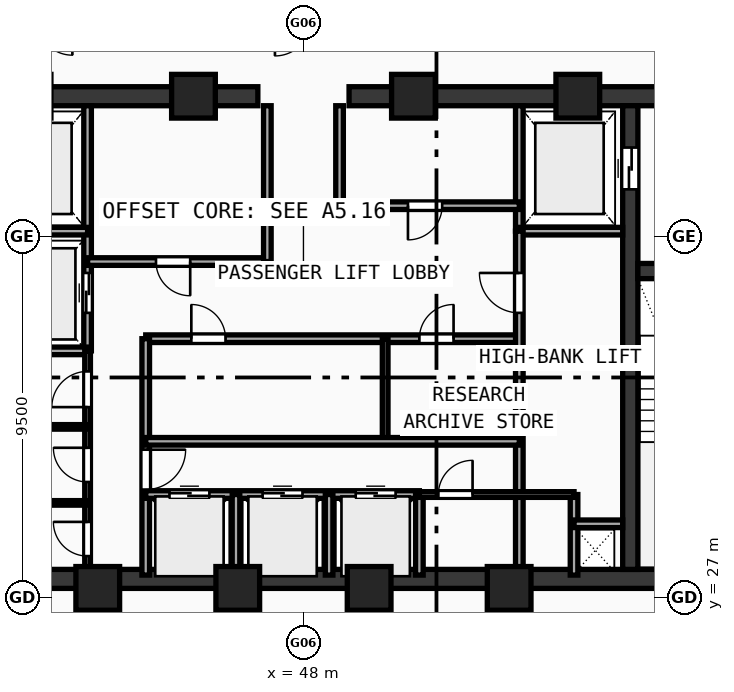
"""IFC4 building model, lengths in metres.
Left out: names, types, materials, properties, quantities, classifications, styles, units other than length and angle.
Written with IfcOpenShell. Run it as: python <this file> out.ifc"""

import sys

from ifc_helpers import new_model, si_unit, direction, frame, frame_2d, origin, origin_with_axes, origin_2d, place, context, subcontext, project, spatial, rectangle, hollow_rectangle, extrude, source, transform, mapped, element, fill, save


model = new_model("IFC4")
c1 = context("Model", 3, precision=1e-05, world=origin(), true_north=direction((0.0, 1.0)))
c2 = subcontext(c1, "Body", "Model", "MODEL_VIEW")
j1 = project(units=[si_unit("LENGTHUNIT", "METRE"), si_unit("PLANEANGLEUNIT", "RADIAN")], contexts=[c1])
p1 = place(None, origin())
s1 = spatial("IfcSite", under=j1, at=p1, CompositionType="ELEMENT")
p2 = place(p1, origin())
s2 = spatial("IfcBuilding", under=s1, at=p2, CompositionType="ELEMENT")
p3 = place(p2, frame((0.0, 0.0, 233.34)))
s3 = spatial("IfcBuildingStorey", under=s2, at=p3, CompositionType="ELEMENT", Elevation=233.34)
p4 = place(p3, frame((35.55, 27.5, 0.0), z_axis=(0.0, 0.0, 1.0), x_axis=(1.0, 0.0, 0.0)))
e1 = element("IfcWall", 1, at=p4, inside=s3, PredefinedType="SHEAR", context=c2, shape_type="SweptSolid", body=[
    extrude(rectangle(XDim=24.9, YDim=0.5, at=frame_2d((12.45, 0.0))), origin(), (0.0, 0.0, 1.0), 3.47),
])
p5 = place(p3, frame((35.55, 40.2, 0.0), z_axis=(0.0, 0.0, 1.0), x_axis=(1.0, 0.0, 0.0)))
e2 = element("IfcWall", 2, at=p5, inside=s3, PredefinedType="SHEAR", context=c2, shape_type="SweptSolid", body=[
    extrude(rectangle(XDim=11.25, YDim=0.5, at=frame_2d((5.625, 0.0))), origin(), (0.0, 0.0, 1.0), 3.47),
])
p6 = place(p5, frame((1.6, 0.0, 0.0)))
e3 = element("IfcOpeningElement", 3, at=p6, cuts=e2, PredefinedType="OPENING", context=c2, shape_type="SweptSolid", body=[
    extrude(rectangle(XDim=1.05, YDim=2.1, at=frame_2d((0.525, 1.05))), frame((0.0, 0.26, 0.0), z_axis=(0.0, -1.0, 0.0), x_axis=(1.0, 0.0, 0.0)), (0.0, 0.0, 1.0), 0.52),
])
p7 = place(p3, frame((49.2, 40.2, 0.0), z_axis=(0.0, 0.0, 1.0), x_axis=(1.0, 0.0, 0.0)))
e4 = element("IfcWall", 4, at=p7, inside=s3, PredefinedType="SHEAR", context=c2, shape_type="SweptSolid", body=[
    extrude(rectangle(XDim=11.25, YDim=0.5, at=frame_2d((5.625, 0.0))), origin(), (0.0, 0.0, 1.0), 3.47),
])
p8 = place(p7, frame((8.6, 0.0, 0.0)))
e5 = element("IfcOpeningElement", 5, at=p8, cuts=e4, PredefinedType="OPENING", context=c2, shape_type="SweptSolid", body=[
    extrude(rectangle(XDim=1.05, YDim=2.1, at=frame_2d((0.525, 1.05))), frame((0.0, 0.26, 0.0), z_axis=(0.0, -1.0, 0.0), x_axis=(1.0, 0.0, 0.0)), (0.0, 0.0, 1.0), 0.52),
])
p9 = place(p3, frame((56.6, 27.75, 0.0), z_axis=(0.0, 0.0, 1.0), x_axis=(0.0, 1.0, 0.0)))
e6 = element("IfcWall", 6, at=p9, inside=s3, PredefinedType="SHEAR", context=c2, shape_type="SweptSolid", body=[
    extrude(rectangle(XDim=12.2, YDim=0.4, at=frame_2d((6.1, 0.0))), origin(), (0.0, 0.0, 1.0), 3.47),
])
p10 = place(p9, frame((10.0, 0.0, 0.0)))
e7 = element("IfcOpeningElement", 7, at=p10, cuts=e6, PredefinedType="OPENING", context=c2, shape_type="SweptSolid", body=[
    extrude(rectangle(XDim=1.1, YDim=2.1, at=frame_2d((0.55, 1.05))), frame((0.0, 0.21, 0.0), z_axis=(0.0, -1.0, 0.0), x_axis=(1.0, 0.0, 0.0)), (0.0, 0.0, 1.0), 0.42),
])
p11 = place(p3, frame((56.8, 35.6, 0.0), z_axis=(0.0, 0.0, 1.0), x_axis=(1.0, 0.0, 0.0)))
e8 = element("IfcWall", 8, at=p11, inside=s3, PredefinedType="SHEAR", context=c2, shape_type="SweptSolid", body=[
    extrude(rectangle(XDim=3.15, YDim=0.4, at=frame_2d((1.575, 0.0))), origin(), (0.0, 0.0, 1.0), 3.47),
])
p12 = place(p11, frame((1.02, 0.0, 0.0)))
e9 = element("IfcOpeningElement", 9, at=p12, cuts=e8, PredefinedType="OPENING", context=c2, shape_type="SweptSolid", body=[
    extrude(rectangle(XDim=1.05, YDim=2.1, at=frame_2d((0.525, 1.05))), frame((0.0, 0.21, 0.0), z_axis=(0.0, -1.0, 0.0), x_axis=(1.0, 0.0, 0.0)), (0.0, 0.0, 1.0), 0.42),
])
m1 = source(origin(), c2, "Body", "SweptSolid", [
    extrude(hollow_rectangle(XDim=1.15, YDim=1.15, WallThickness=0.048, at=origin_2d()), origin(), (0.0, 0.0, 1.0), 3.73),
])
for number, where, z_axis, x_axis in (
    (10, (42.588, 27.25, -0.26), (0.0, 0.0, 1.0), (1.0, 0.0, 0.0)),
    (11, (46.272, 27.25, -0.26), (0.0, 0.0, 1.0), (1.0, 0.0, 0.0)),
    (12, (49.729, 27.25, -0.26), (0.0, 0.0, 1.0), (1.0, 0.0, 0.0)),
    (13, (53.412, 27.25, -0.26), (0.0, 0.0, 1.0), (1.0, 0.0, 0.0)),
    (14, (55.219, 40.2, -0.26), (0.0, 0.0, 1.0), (1.0, 0.0, 0.0)),
    (15, (50.894, 40.2, -0.26), (0.0, 0.0, 1.0), (1.0, 0.0, 0.0)),
    (16, (45.106, 40.2, -0.26), (0.0, 0.0, 1.0), (1.0, 0.0, 0.0)),
):
    element("IfcColumn", number, at=place(p3, frame(where, z_axis=z_axis, x_axis=x_axis)), inside=s3, PredefinedType="COLUMN", context=c2, shape_type="MappedRepresentation", body=[
        mapped(m1, transform((0.0, 0.0, 0.0), scale=1.0)),
    ])
p13 = place(p3, frame((42.32, 33.5, 0.0), z_axis=(0.0, 0.0, 1.0), x_axis=(0.0, 1.0, 0.0)))
e17 = element("IfcWall", 17, at=p13, inside=s3, PredefinedType="SOLIDWALL", context=c2, shape_type="SweptSolid", body=[
    extrude(rectangle(XDim=6.45, YDim=0.2, at=frame_2d((3.225, 0.0))), origin(), (0.0, 0.0, 1.0), 3.47),
])
p14 = place(p13, frame((1.0, 0.0, 0.0)))
e18 = element("IfcOpeningElement", 18, at=p14, cuts=e17, PredefinedType="OPENING", context=c2, shape_type="SweptSolid", body=[
    extrude(rectangle(XDim=1.05, YDim=2.1, at=frame_2d((0.525, 1.05))), frame((0.0, 0.11, 0.0), z_axis=(0.0, -1.0, 0.0), x_axis=(1.0, 0.0, 0.0)), (0.0, 0.0, 1.0), 0.22),
])
for number, where, z_axis, x_axis in (
    (19, (39.6, 36.65, 0.0), (0.0, 0.0, 1.0), (1.0, 0.0, 0.0)),
    (20, (39.6, 33.5, 0.0), (0.0, 0.0, 1.0), (1.0, 0.0, 0.0)),
):
    element("IfcWall", number, at=place(p3, frame(where, z_axis=z_axis, x_axis=x_axis)), inside=s3, PredefinedType="SOLIDWALL", context=c2, shape_type="SweptSolid", body=[
        extrude(rectangle(XDim=2.72, YDim=0.2, at=frame_2d((1.36, 0.0))), origin(), (0.0, 0.0, 1.0), 3.47),
    ])
p15 = place(p3, frame((53.68, 36.65, 0.0), z_axis=(0.0, 0.0, 1.0), x_axis=(0.0, 1.0, 0.0)))
e21 = element("IfcWall", 21, at=p15, inside=s3, PredefinedType="SOLIDWALL", context=c2, shape_type="SweptSolid", body=[
    extrude(rectangle(XDim=3.3, YDim=0.2, at=frame_2d((1.65, 0.0))), origin(), (0.0, 0.0, 1.0), 3.47),
])
p16 = place(p3, frame((53.68, 36.65, 0.0), z_axis=(0.0, 0.0, 1.0), x_axis=(1.0, 0.0, 0.0)))
e22 = element("IfcWall", 22, at=p16, inside=s3, PredefinedType="SOLIDWALL", context=c2, shape_type="SweptSolid", body=[
    extrude(rectangle(XDim=2.72, YDim=0.2, at=frame_2d((1.36, 0.0))), origin(), (0.0, 0.0, 1.0), 3.47),
])
p17 = place(p3, frame((42.32, 35.85, 0.0), z_axis=(0.0, 0.0, 1.0), x_axis=(1.0, 0.0, 0.0)))
e23 = element("IfcWall", 23, at=p17, inside=s3, PredefinedType="SOLIDWALL", context=c2, shape_type="SweptSolid", body=[
    extrude(rectangle(XDim=4.73, YDim=0.2, at=frame_2d((2.365, 0.0))), origin(), (0.0, 0.0, 1.0), 3.47),
])
p18 = place(p17, frame((1.8, 0.0, 0.0)))
e24 = element("IfcOpeningElement", 24, at=p18, cuts=e23, PredefinedType="OPENING", context=c2, shape_type="SweptSolid", body=[
    extrude(rectangle(XDim=0.9, YDim=2.1, at=frame_2d((0.45, 1.05))), frame((0.0, 0.11, 0.0), z_axis=(0.0, -1.0, 0.0), x_axis=(1.0, 0.0, 0.0)), (0.0, 0.0, 1.0), 0.22),
])
p19 = place(p3, frame((48.95, 37.32, 0.0), z_axis=(0.0, 0.0, 1.0), x_axis=(1.0, 0.0, 0.0)))
e25 = element("IfcWall", 25, at=p19, inside=s3, PredefinedType="SOLIDWALL", context=c2, shape_type="SweptSolid", body=[
    extrude(rectangle(XDim=4.73, YDim=0.2, at=frame_2d((2.365, 0.0))), origin(), (0.0, 0.0, 1.0), 3.47),
])
p20 = place(p19, frame((1.8, 0.0, 0.0)))
e26 = element("IfcOpeningElement", 26, at=p20, cuts=e25, PredefinedType="OPENING", context=c2, shape_type="SweptSolid", body=[
    extrude(rectangle(XDim=0.9, YDim=2.1, at=frame_2d((0.45, 1.05))), frame((0.0, 0.11, 0.0), z_axis=(0.0, -1.0, 0.0), x_axis=(1.0, 0.0, 0.0)), (0.0, 0.0, 1.0), 0.22),
])
p21 = place(p3, frame((47.05, 35.85, 0.0), z_axis=(0.0, 0.0, 1.0), x_axis=(0.0, 1.0, 0.0)))
e27 = element("IfcWall", 27, at=p21, inside=s3, PredefinedType="SOLIDWALL", context=c2, shape_type="SweptSolid", body=[
    extrude(rectangle(XDim=4.1, YDim=0.2, at=frame_2d((2.05, 0.0))), origin(), (0.0, 0.0, 1.0), 3.47),
])
p22 = place(p3, frame((48.95, 37.32, 0.0), z_axis=(0.0, 0.0, 1.0), x_axis=(0.0, 1.0, 0.0)))
e28 = element("IfcWall", 28, at=p22, inside=s3, PredefinedType="SOLIDWALL", context=c2, shape_type="SweptSolid", body=[
    extrude(rectangle(XDim=2.63, YDim=0.2, at=frame_2d((1.315, 0.0))), origin(), (0.0, 0.0, 1.0), 3.47),
])
p23 = place(p3, frame((43.85, 33.82, 0.0), z_axis=(0.0, 0.0, 1.0), x_axis=(1.0, 0.0, 0.0)))
e29 = element("IfcWall", 29, at=p23, inside=s3, PredefinedType="SOLIDWALL", context=c2, shape_type="SweptSolid", body=[
    extrude(rectangle(XDim=9.83, YDim=0.2, at=frame_2d((4.915, 0.0))), origin(), (0.0, 0.0, 1.0), 3.47),
])
p24 = place(p23, frame((1.2, 0.0, 0.0)))
e30 = element("IfcOpeningElement", 30, at=p24, cuts=e29, PredefinedType="OPENING", context=c2, shape_type="SweptSolid", body=[
    extrude(rectangle(XDim=0.9, YDim=2.1, at=frame_2d((0.45, 1.05))), frame((0.0, 0.11, 0.0), z_axis=(0.0, -1.0, 0.0), x_axis=(1.0, 0.0, 0.0)), (0.0, 0.0, 1.0), 0.22),
])
p25 = place(p23, frame((7.2, 0.0, 0.0)))
e31 = element("IfcOpeningElement", 31, at=p25, cuts=e29, PredefinedType="OPENING", context=c2, shape_type="SweptSolid", body=[
    extrude(rectangle(XDim=0.9, YDim=2.1, at=frame_2d((0.45, 1.05))), frame((0.0, 0.11, 0.0), z_axis=(0.0, -1.0, 0.0), x_axis=(1.0, 0.0, 0.0)), (0.0, 0.0, 1.0), 0.22),
])
p26 = place(p3, frame((43.85, 27.6, 0.0), z_axis=(0.0, 0.0, 1.0), x_axis=(0.0, 1.0, 0.0)))
e32 = element("IfcWall", 32, at=p26, inside=s3, PredefinedType="SOLIDWALL", context=c2, shape_type="SweptSolid", body=[
    extrude(rectangle(XDim=6.22, YDim=0.2, at=frame_2d((3.11, 0.0))), origin(), (0.0, 0.0, 1.0), 3.47),
])
p27 = place(p26, frame((2.25, 0.0, 0.0)))
e33 = element("IfcOpeningElement", 33, at=p27, cuts=e32, PredefinedType="OPENING", context=c2, shape_type="SweptSolid", body=[
    extrude(rectangle(XDim=1.05, YDim=2.1, at=frame_2d((0.525, 1.05))), frame((0.0, 0.11, 0.0), z_axis=(0.0, -1.0, 0.0), x_axis=(1.0, 0.0, 0.0)), (0.0, 0.0, 1.0), 0.22),
])
p28 = place(p3, frame((53.68, 27.6, 0.0), z_axis=(0.0, 0.0, 1.0), x_axis=(0.0, 1.0, 0.0)))
e34 = element("IfcWall", 34, at=p28, inside=s3, PredefinedType="SOLIDWALL", context=c2, shape_type="SweptSolid", body=[
    extrude(rectangle(XDim=9.05, YDim=0.2, at=frame_2d((4.525, 0.0))), origin(), (0.0, 0.0, 1.0), 3.47),
])
p29 = place(p28, frame((6.9, 0.0, 0.0)))
e35 = element("IfcOpeningElement", 35, at=p29, cuts=e34, PredefinedType="OPENING", context=c2, shape_type="SweptSolid", body=[
    extrude(rectangle(XDim=1.05, YDim=2.1, at=frame_2d((0.525, 1.05))), frame((0.0, 0.11, 0.0), z_axis=(0.0, -1.0, 0.0), x_axis=(1.0, 0.0, 0.0)), (0.0, 0.0, 1.0), 0.22),
])
p30 = place(p3, frame((50.15, 31.12, 0.0), z_axis=(0.0, 0.0, 1.0), x_axis=(0.0, 1.0, 0.0)))
e36 = element("IfcWall", 36, at=p30, inside=s3, PredefinedType="PARTITIONING", context=c2, shape_type="SweptSolid", body=[
    extrude(rectangle(XDim=2.7, YDim=0.15, at=frame_2d((1.35, 0.0))), origin(), (0.0, 0.0, 1.0), 3.47),
])
p31 = place(p3, frame((43.85, 29.72, 0.0), z_axis=(0.0, 0.0, 1.0), x_axis=(1.0, 0.0, 0.0)))
e37 = element("IfcWall", 37, at=p31, inside=s3, PredefinedType="SOLIDWALL", context=c2, shape_type="SweptSolid", body=[
    extrude(rectangle(XDim=7.2, YDim=0.2, at=frame_2d((3.6, 0.0))), origin(), (0.0, 0.0, 1.0), 3.47),
])
p32 = place(p31, frame((0.625, 0.0, 0.0)))
e38 = element("IfcOpeningElement", 38, at=p32, cuts=e37, PredefinedType="OPENING", context=c2, shape_type="SweptSolid", body=[
    extrude(rectangle(XDim=1.05, YDim=2.1, at=frame_2d((0.525, 1.05))), frame((0.0, 0.11, 0.0), z_axis=(0.0, -1.0, 0.0), x_axis=(1.0, 0.0, 0.0)), (0.0, 0.0, 1.0), 0.22),
])
p33 = place(p31, frame((3.075, 0.0, 0.0)))
e39 = element("IfcOpeningElement", 39, at=p33, cuts=e37, PredefinedType="OPENING", context=c2, shape_type="SweptSolid", body=[
    extrude(rectangle(XDim=1.05, YDim=2.1, at=frame_2d((0.525, 1.05))), frame((0.0, 0.11, 0.0), z_axis=(0.0, -1.0, 0.0), x_axis=(1.0, 0.0, 0.0)), (0.0, 0.0, 1.0), 0.22),
])
p34 = place(p31, frame((5.525, 0.0, 0.0)))
e40 = element("IfcOpeningElement", 40, at=p34, cuts=e37, PredefinedType="OPENING", context=c2, shape_type="SweptSolid", body=[
    extrude(rectangle(XDim=1.05, YDim=2.1, at=frame_2d((0.525, 1.05))), frame((0.0, 0.11, 0.0), z_axis=(0.0, -1.0, 0.0), x_axis=(1.0, 0.0, 0.0)), (0.0, 0.0, 1.0), 0.22),
])
p35 = place(p3, frame((51.05, 27.6, 0.0), z_axis=(0.0, 0.0, 1.0), x_axis=(0.0, 1.0, 0.0)))
e41 = element("IfcWall", 41, at=p35, inside=s3, PredefinedType="SOLIDWALL", context=c2, shape_type="SweptSolid", body=[
    extrude(rectangle(XDim=2.12, YDim=0.2, at=frame_2d((1.06, 0.0))), origin(), (0.0, 0.0, 1.0), 3.47),
])
p36 = place(p3, frame((43.85, 31.12, 0.0), z_axis=(0.0, 0.0, 1.0), x_axis=(1.0, 0.0, 0.0)))
e42 = element("IfcWall", 42, at=p36, inside=s3, PredefinedType="SOLIDWALL", context=c2, shape_type="SweptSolid", body=[
    extrude(rectangle(XDim=9.83, YDim=0.2, at=frame_2d((4.915, 0.0))), origin(), (0.0, 0.0, 1.0), 3.47),
])
for number, where, z_axis, x_axis in (
    (43, (46.225, 27.6, 0.0), (0.0, 0.0, 1.0), (0.0, 1.0, 0.0)),
    (44, (48.675, 27.6, 0.0), (0.0, 0.0, 1.0), (0.0, 1.0, 0.0)),
    (45, (55.12, 27.6, 0.0), (0.0, 0.0, 1.0), (0.0, 1.0, 0.0)),
):
    element("IfcWall", number, at=place(p3, frame(where, z_axis=z_axis, x_axis=x_axis)), inside=s3, PredefinedType="SOLIDWALL", context=c2, shape_type="SweptSolid", body=[
        extrude(rectangle(XDim=2.12, YDim=0.2, at=frame_2d((1.06, 0.0))), origin(), (0.0, 0.0, 1.0), 3.47),
    ])
p37 = place(p3, frame((55.12, 28.95, 0.0), z_axis=(0.0, 0.0, 1.0), x_axis=(1.0, 0.0, 0.0)))
e46 = element("IfcWall", 46, at=p37, inside=s3, PredefinedType="SOLIDWALL", context=c2, shape_type="SweptSolid", body=[
    extrude(rectangle(XDim=1.28, YDim=0.2, at=frame_2d((0.64, 0.0))), origin(), (0.0, 0.0, 1.0), 3.47),
])
p38 = place(p3, frame((42.32, 27.6, 0.0), z_axis=(0.0, 0.0, 1.0), x_axis=(0.0, 1.0, 0.0)))
e47 = element("IfcWall", 47, at=p38, inside=s3, PredefinedType="PARTITIONING", context=c2, shape_type="SweptSolid", body=[
    extrude(rectangle(XDim=5.9, YDim=0.15, at=frame_2d((2.95, 0.0))), origin(), (0.0, 0.0, 1.0), 3.47),
])
p39 = place(p38, frame((0.5, 0.0, 0.0)))
e48 = element("IfcOpeningElement", 48, at=p39, cuts=e47, PredefinedType="OPENING", context=c2, shape_type="SweptSolid", body=[
    extrude(rectangle(XDim=0.9, YDim=2.1, at=frame_2d((0.45, 1.05))), frame((0.0, 0.085, 0.0), z_axis=(0.0, -1.0, 0.0), x_axis=(1.0, 0.0, 0.0)), (0.0, 0.0, 1.0), 0.17),
])
p40 = place(p38, frame((2.45, 0.0, 0.0)))
e49 = element("IfcOpeningElement", 49, at=p40, cuts=e47, PredefinedType="OPENING", context=c2, shape_type="SweptSolid", body=[
    extrude(rectangle(XDim=0.9, YDim=2.1, at=frame_2d((0.45, 1.05))), frame((0.0, 0.085, 0.0), z_axis=(0.0, -1.0, 0.0), x_axis=(1.0, 0.0, 0.0)), (0.0, 0.0, 1.0), 0.17),
])
p41 = place(p38, frame((4.42, 0.0, 0.0)))
e50 = element("IfcOpeningElement", 50, at=p41, cuts=e47, PredefinedType="OPENING", context=c2, shape_type="SweptSolid", body=[
    extrude(rectangle(XDim=0.94, YDim=2.1, at=frame_2d((0.47, 1.05))), frame((0.0, 0.085, 0.0), z_axis=(0.0, -1.0, 0.0), x_axis=(1.0, 0.0, 0.0)), (0.0, 0.0, 1.0), 0.17),
])
p42 = place(p3, frame((51.05, 29.72, 0.0), z_axis=(0.0, 0.0, 1.0), x_axis=(1.0, 0.0, 0.0)))
e51 = element("IfcWall", 51, at=p42, inside=s3, PredefinedType="PARTITIONING", context=c2, shape_type="SweptSolid", body=[
    extrude(rectangle(XDim=4.07, YDim=0.15, at=frame_2d((2.035, 0.0))), origin(), (0.0, 0.0, 1.0), 3.47),
])
p43 = place(p42, frame((0.5, 0.0, 0.0)))
e52 = element("IfcOpeningElement", 52, at=p43, cuts=e51, PredefinedType="OPENING", context=c2, shape_type="SweptSolid", body=[
    extrude(rectangle(XDim=0.9, YDim=2.1, at=frame_2d((0.45, 1.05))), frame((0.0, 0.085, 0.0), z_axis=(0.0, -1.0, 0.0), x_axis=(1.0, 0.0, 0.0)), (0.0, 0.0, 1.0), 0.17),
])
for number, where, z_axis, x_axis in (
    (53, (39.6, 29.5, 0.0), (0.0, 0.0, 1.0), (1.0, 0.0, 0.0)),
    (54, (39.6, 31.5, 0.0), (0.0, 0.0, 1.0), (1.0, 0.0, 0.0)),
):
    element("IfcWall", number, at=place(p3, frame(where, z_axis=z_axis, x_axis=x_axis)), inside=s3, PredefinedType="PARTITIONING", context=c2, shape_type="SweptSolid", body=[
        extrude(rectangle(XDim=2.72, YDim=0.12, at=frame_2d((1.36, 0.0))), origin(), (0.0, 0.0, 1.0), 3.47),
    ])
m2 = source(origin(), c2, "Body", "SweptSolid", [
    extrude(rectangle(XDim=1.1, YDim=2.1, at=frame_2d((0.55, 1.05))), frame((0.0, 0.025, 0.0), z_axis=(0.0, -1.0, 0.0), x_axis=(1.0, 0.0, 0.0)), (0.0, 0.0, 1.0), 0.05),
])
p44 = place(p10, origin_with_axes())
e55 = element("IfcDoor", 55, at=p44, inside=s3, OperationType="DOUBLE_DOOR_SLIDING", PredefinedType="DOOR", context=c2, shape_type="MappedRepresentation", body=[
    mapped(m2, transform((0.0, 0.0, 0.0), scale=1.0)),
])
fill(e7, e55)
m3 = source(origin(), c2, "Body", "SweptSolid", [
    extrude(rectangle(XDim=1.05, YDim=2.1, at=frame_2d((0.525, 1.05))), frame((0.0, 0.025, 0.0), z_axis=(0.0, -1.0, 0.0), x_axis=(1.0, 0.0, 0.0)), (0.0, 0.0, 1.0), 0.05),
])
p45 = place(p14, origin_with_axes())
e56 = element("IfcDoor", 56, at=p45, inside=s3, OperationType="DOUBLE_DOOR_SLIDING", PredefinedType="DOOR", context=c2, shape_type="MappedRepresentation", body=[
    mapped(m3, transform((0.0, 0.0, 0.0), scale=1.0)),
])
fill(e18, e56)
m4 = source(origin(), c2, "Body", "SweptSolid", [
    extrude(rectangle(XDim=0.9, YDim=2.1, at=frame_2d((0.45, 1.05))), frame((0.0, 0.025, 0.0), z_axis=(0.0, -1.0, 0.0), x_axis=(1.0, 0.0, 0.0)), (0.0, 0.0, 1.0), 0.05),
])
p46 = place(p18, frame((0.9, 0.0, 0.0), z_axis=(0.0, 0.0, 1.0), x_axis=(-1.0, 0.0, 0.0)))
e57 = element("IfcDoor", 57, at=p46, inside=s3, OperationType="SINGLE_SWING_LEFT", PredefinedType="DOOR", context=c2, shape_type="MappedRepresentation", body=[
    mapped(m4, transform((0.0, 0.0, 0.0), scale=1.0)),
])
fill(e24, e57)
p47 = place(p20, frame((0.9, 0.0, 0.0), z_axis=(0.0, 0.0, 1.0), x_axis=(-1.0, 0.0, 0.0)))
e58 = element("IfcDoor", 58, at=p47, inside=s3, OperationType="SINGLE_SWING_RIGHT", PredefinedType="DOOR", context=c2, shape_type="MappedRepresentation", body=[
    mapped(m4, transform((0.0, 0.0, 0.0), scale=1.0)),
])
fill(e26, e58)
p48 = place(p24, origin_with_axes())
e59 = element("IfcDoor", 59, at=p48, inside=s3, OperationType="SINGLE_SWING_LEFT", PredefinedType="DOOR", context=c2, shape_type="MappedRepresentation", body=[
    mapped(m4, transform((0.0, 0.0, 0.0), scale=1.0)),
])
fill(e30, e59)
p49 = place(p25, origin_with_axes())
e60 = element("IfcDoor", 60, at=p49, inside=s3, OperationType="SINGLE_SWING_RIGHT", PredefinedType="DOOR", context=c2, shape_type="MappedRepresentation", body=[
    mapped(m4, transform((0.0, 0.0, 0.0), scale=1.0)),
])
fill(e31, e60)
p50 = place(p27, frame((1.05, 0.0, 0.0), z_axis=(0.0, 0.0, 1.0), x_axis=(-1.0, 0.0, 0.0)))
e61 = element("IfcDoor", 61, at=p50, inside=s3, OperationType="SINGLE_SWING_LEFT", PredefinedType="DOOR", context=c2, shape_type="MappedRepresentation", body=[
    mapped(m3, transform((0.0, 0.0, 0.0), scale=1.0)),
])
fill(e33, e61)
p51 = place(p29, origin_with_axes())
e62 = element("IfcDoor", 62, at=p51, inside=s3, OperationType="SINGLE_SWING_RIGHT", PredefinedType="DOOR", context=c2, shape_type="MappedRepresentation", body=[
    mapped(m3, transform((0.0, 0.0, 0.0), scale=1.0)),
])
fill(e35, e62)
p52 = place(p32, origin_with_axes())
e63 = element("IfcDoor", 63, at=p52, inside=s3, OperationType="DOUBLE_DOOR_SLIDING", PredefinedType="DOOR", context=c2, shape_type="MappedRepresentation", body=[
    mapped(m3, transform((0.0, 0.0, 0.0), scale=1.0)),
])
fill(e38, e63)
p53 = place(p33, origin_with_axes())
e64 = element("IfcDoor", 64, at=p53, inside=s3, OperationType="DOUBLE_DOOR_SLIDING", PredefinedType="DOOR", context=c2, shape_type="MappedRepresentation", body=[
    mapped(m3, transform((0.0, 0.0, 0.0), scale=1.0)),
])
fill(e39, e64)
p54 = place(p34, origin_with_axes())
e65 = element("IfcDoor", 65, at=p54, inside=s3, OperationType="DOUBLE_DOOR_SLIDING", PredefinedType="DOOR", context=c2, shape_type="MappedRepresentation", body=[
    mapped(m3, transform((0.0, 0.0, 0.0), scale=1.0)),
])
fill(e40, e65)
p55 = place(p39, origin_with_axes())
e66 = element("IfcDoor", 66, at=p55, inside=s3, OperationType="SINGLE_SWING_RIGHT", PredefinedType="DOOR", context=c2, shape_type="MappedRepresentation", body=[
    mapped(m4, transform((0.0, 0.0, 0.0), scale=1.0)),
])
fill(e48, e66)
p56 = place(p40, origin_with_axes())
e67 = element("IfcDoor", 67, at=p56, inside=s3, OperationType="SINGLE_SWING_RIGHT", PredefinedType="DOOR", context=c2, shape_type="MappedRepresentation", body=[
    mapped(m4, transform((0.0, 0.0, 0.0), scale=1.0)),
])
fill(e49, e67)
m5 = source(origin(), c2, "Body", "SweptSolid", [
    extrude(rectangle(XDim=0.94, YDim=2.1, at=frame_2d((0.47, 1.05))), frame((0.0, 0.025, 0.0), z_axis=(0.0, -1.0, 0.0), x_axis=(1.0, 0.0, 0.0)), (0.0, 0.0, 1.0), 0.05),
])
p57 = place(p41, origin_with_axes())
e68 = element("IfcDoor", 68, at=p57, inside=s3, OperationType="SINGLE_SWING_LEFT", PredefinedType="DOOR", context=c2, shape_type="MappedRepresentation", body=[
    mapped(m5, transform((0.0, 0.0, 0.0), scale=1.0)),
])
fill(e50, e68)
p58 = place(p43, origin_with_axes())
e69 = element("IfcDoor", 69, at=p58, inside=s3, OperationType="SINGLE_SWING_RIGHT", PredefinedType="DOOR", context=c2, shape_type="MappedRepresentation", body=[
    mapped(m4, transform((0.0, 0.0, 0.0), scale=1.0)),
])
fill(e52, e69)
save(model, sys.argv[1])
